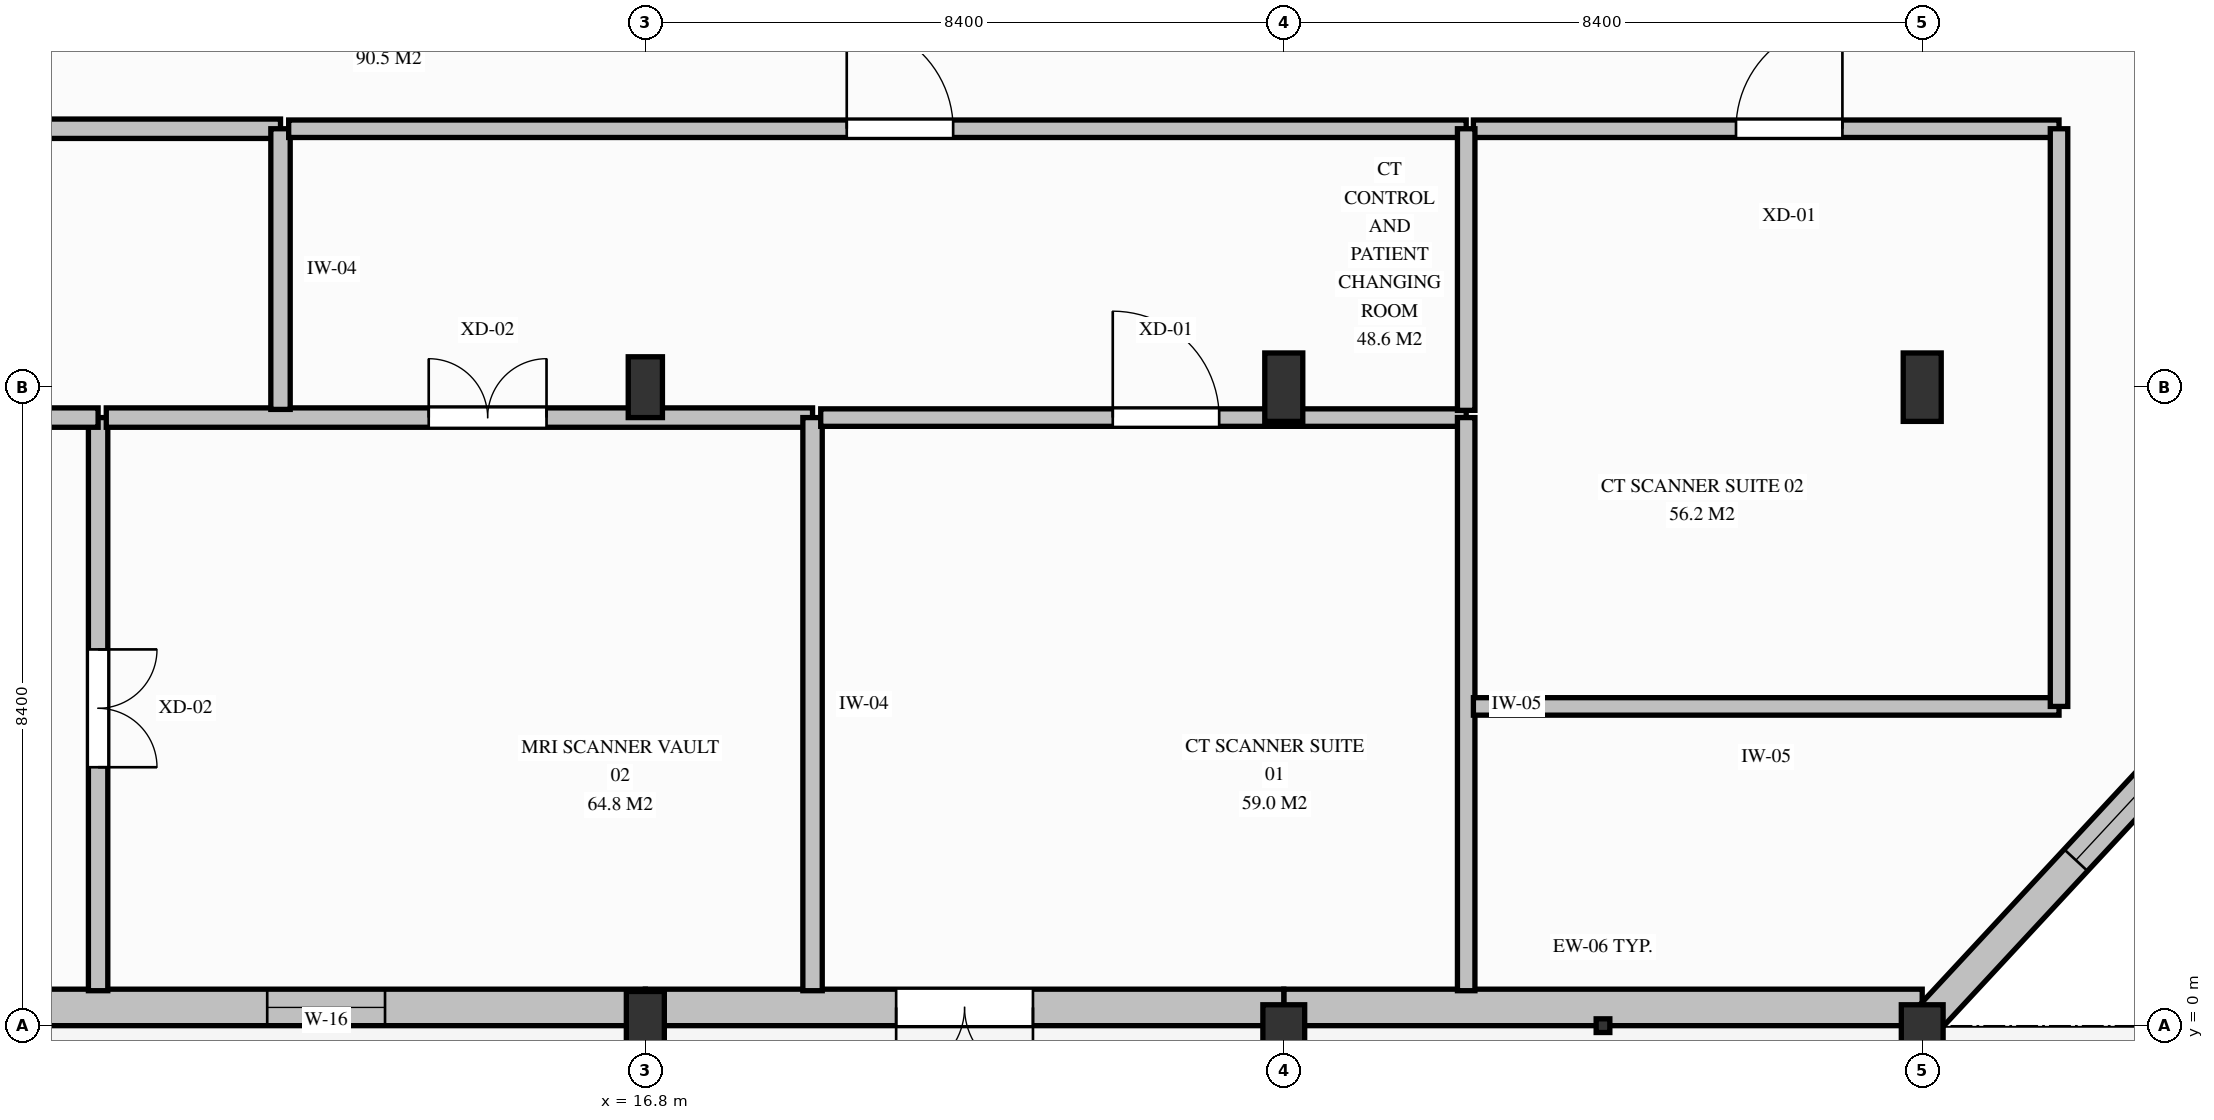
"""IFC4 building model, lengths in metres.
Left out: names, types, materials, properties, quantities, classifications, styles, units other than length and angle.
Written with IfcOpenShell. Run it as: python <this file> out.ifc"""

import sys

from ifc_helpers import new_model, si_unit, direction, frame, frame_2d, origin, origin_2d, place, context, subcontext, project, spatial, rectangle, hollow_rectangle, circle, extrude, element, fill, save


model = new_model("IFC4")
c1 = context("Model", 3, precision=1e-05, world=origin(), true_north=direction((0.0, 1.0)))
c2 = subcontext(c1, "Body", "Model", "MODEL_VIEW")
j1 = project(units=[si_unit("LENGTHUNIT", "METRE"), si_unit("PLANEANGLEUNIT", "RADIAN")], contexts=[c1])
p1 = place(None, origin())
s1 = spatial("IfcSite", under=j1, at=p1, CompositionType="ELEMENT")
p2 = place(p1, origin())
s2 = spatial("IfcBuilding", under=s1, at=p2, CompositionType="ELEMENT")
p3 = place(p2, origin())
s3 = spatial("IfcBuildingStorey", under=s2, at=p3, CompositionType="ELEMENT", Elevation=0.0)
p4 = place(p3, frame((16.8, 0.0, 0.0), z_axis=(0.0, 0.0, 1.0), x_axis=(1.0, 0.0, 0.0)))
e1 = element("IfcColumn", 1, at=p4, inside=s3, PredefinedType="COLUMN", context=c2, shape_type="SweptSolid", body=[
    extrude(rectangle(XDim=0.5, YDim=0.9, at=origin_2d()), origin(), (0.0, 0.0, 1.0), 4.5),
])
p5 = place(p3, frame((16.8, 8.4, 0.0), z_axis=(0.0, 0.0, 1.0), x_axis=(1.0, 0.0, 0.0)))
e2 = element("IfcColumn", 2, at=p5, inside=s3, PredefinedType="COLUMN", context=c2, shape_type="SweptSolid", body=[
    extrude(rectangle(XDim=0.45, YDim=0.8, at=origin_2d()), origin(), (0.0, 0.0, 1.0), 4.5),
])
p6 = place(p3, frame((25.2, 0.0, 0.0), z_axis=(0.0, 0.0, 1.0), x_axis=(1.0, 0.0, 0.0)))
e3 = element("IfcColumn", 3, at=p6, inside=s3, PredefinedType="COLUMN", context=c2, shape_type="SweptSolid", body=[
    extrude(circle(Radius=0.275, at=origin_2d()), origin(), (0.0, 0.0, 1.0), 4.5),
])
p7 = place(p3, frame((25.2, 8.4, 0.0), z_axis=(0.0, 0.0, 1.0), x_axis=(1.0, 0.0, 0.0)))
e4 = element("IfcColumn", 4, at=p7, inside=s3, PredefinedType="COLUMN", context=c2, shape_type="SweptSolid", body=[
    extrude(rectangle(XDim=0.5, YDim=0.9, at=origin_2d()), origin(), (0.0, 0.0, 1.0), 4.5),
])
p8 = place(p3, frame((33.6, 0.0, 0.0), z_axis=(0.0, 0.0, 1.0), x_axis=(1.0, 0.0, 0.0)))
e5 = element("IfcColumn", 5, at=p8, inside=s3, PredefinedType="COLUMN", context=c2, shape_type="SweptSolid", body=[
    extrude(circle(Radius=0.275, at=origin_2d()), origin(), (0.0, 0.0, 1.0), 4.5),
])
p9 = place(p3, frame((33.6, 8.4, 0.0), z_axis=(0.0, 0.0, 1.0), x_axis=(1.0, 0.0, 0.0)))
e6 = element("IfcColumn", 6, at=p9, inside=s3, PredefinedType="COLUMN", context=c2, shape_type="SweptSolid", body=[
    extrude(rectangle(XDim=0.5, YDim=0.9, at=origin_2d()), origin(), (0.0, 0.0, 1.0), 4.5),
])
p10 = place(p3, frame((29.4, 0.0, 0.0), z_axis=(0.0, 0.0, 1.0), x_axis=(1.0, 0.0, 0.0)))
e7 = element("IfcColumn", 7, at=p10, inside=s3, PredefinedType="PILASTER", context=c2, shape_type="SweptSolid", body=[
    extrude(hollow_rectangle(XDim=0.18, YDim=0.18, WallThickness=0.01, InnerFilletRadius=0.015, OuterFilletRadius=0.025, at=origin_2d()), origin(), (0.0, 0.0, 1.0), 4.5),
])
p11 = place(p3, frame((33.6, 0.24, 0.0), z_axis=(0.0, 0.0, 1.0), x_axis=(-1.0, 0.0, 0.0)))
e8 = element("IfcWall", 8, at=p11, inside=s3, PredefinedType="SOLIDWALL", context=c2, shape_type="SweptSolid", body=[
    extrude(rectangle(XDim=8.4, YDim=0.48, at=frame_2d((4.2, 0.0))), origin(), (0.0, 0.0, 1.0), 2.828),
])
p12 = place(p3, frame((25.2, 0.24, 0.0), z_axis=(0.0, 0.0, 1.0), x_axis=(-1.0, 0.0, 0.0)))
e9 = element("IfcWall", 9, at=p12, inside=s3, PredefinedType="SOLIDWALL", context=c2, shape_type="SweptSolid", body=[
    extrude(rectangle(XDim=8.4, YDim=0.48, at=frame_2d((4.2, 0.0))), origin(), (0.0, 0.0, 1.0), 2.828),
])
p13 = place(p12, frame((3.3, 0.0, 0.0)))
e10 = element("IfcOpeningElement", 10, at=p13, cuts=e9, PredefinedType="OPENING", context=c2, shape_type="SweptSolid", body=[
    extrude(rectangle(XDim=1.8, YDim=2.4, at=frame_2d((0.9, 1.2))), frame((0.0, 0.25, 0.0), z_axis=(0.0, -1.0, 0.0), x_axis=(1.0, 0.0, 0.0)), (0.0, 0.0, 1.0), 0.5),
])
p14 = place(p3, frame((16.8, 0.24, 0.0), z_axis=(0.0, 0.0, 1.0), x_axis=(-1.0, 0.0, 0.0)))
e11 = element("IfcWall", 11, at=p14, inside=s3, PredefinedType="SOLIDWALL", context=c2, shape_type="SweptSolid", body=[
    extrude(rectangle(XDim=8.4, YDim=0.48, at=frame_2d((4.2, 0.0))), origin(), (0.0, 0.0, 1.0), 2.828),
])
p15 = place(p14, frame((3.425, 0.0, 0.85)))
e12 = element("IfcOpeningElement", 12, at=p15, cuts=e11, PredefinedType="OPENING", context=c2, shape_type="SweptSolid", body=[
    extrude(rectangle(XDim=1.55, YDim=1.6, at=frame_2d((0.775, 0.8))), frame((0.0, 0.25, 0.0), z_axis=(0.0, -1.0, 0.0), x_axis=(1.0, 0.0, 0.0)), (0.0, 0.0, 1.0), 0.5),
])
p16 = place(p3, frame((41.4, 8.4, 0.0), z_axis=(0.0, 0.0, 1.0), x_axis=(-0.680446197767, -0.732798043082, 0.0)))
e13 = element("IfcWall", 13, at=p16, inside=s3, PredefinedType="SOLIDWALL", context=c2, shape_type="SweptSolid", body=[
    extrude(rectangle(XDim=11.463, YDim=0.42, at=frame_2d((5.731, 0.0))), origin(), (0.0, 0.0, 1.0), 2.828),
])
p17 = place(p16, frame((3.121, 0.0, 0.85)))
e14 = element("IfcOpeningElement", 14, at=p17, cuts=e13, PredefinedType="OPENING", context=c2, shape_type="SweptSolid", body=[
    extrude(rectangle(XDim=1.4, YDim=1.65, at=frame_2d((0.7, 0.825))), frame((0.0, 0.22, 0.0), z_axis=(0.0, -1.0, 0.0), x_axis=(1.0, 0.0, 0.0)), (0.0, 0.0, 1.0), 0.44),
])
p18 = place(p16, frame((6.792, 0.0, 0.85)))
e15 = element("IfcOpeningElement", 15, at=p18, cuts=e13, PredefinedType="OPENING", context=c2, shape_type="SweptSolid", body=[
    extrude(rectangle(XDim=1.7, YDim=1.75, at=frame_2d((0.85, 0.875))), frame((0.0, 0.22, 0.0), z_axis=(0.0, -1.0, 0.0), x_axis=(1.0, 0.0, 0.0)), (0.0, 0.0, 1.0), 0.44),
])
p19 = place(p3, frame((9.6, 8.0, 0.0), z_axis=(0.0, 0.0, 1.0), x_axis=(0.0, -1.0, 0.0)))
e16 = element("IfcWall", 16, at=p19, inside=s3, PredefinedType="PARTITIONING", context=c2, shape_type="SweptSolid", body=[
    extrude(rectangle(XDim=7.54, YDim=0.255, at=frame_2d((3.77, 0.0))), origin(), (0.0, 0.0, 1.0), 3.913),
])
p20 = place(p19, frame((3.05, 0.0, 0.0)))
e17 = element("IfcOpeningElement", 17, at=p20, cuts=e16, PredefinedType="OPENING", context=c2, shape_type="SweptSolid", body=[
    extrude(rectangle(XDim=1.55, YDim=2.22, at=frame_2d((0.775, 1.11))), frame((0.0, 0.137, 0.0), z_axis=(0.0, -1.0, 0.0), x_axis=(1.0, 0.0, 0.0)), (0.0, 0.0, 1.0), 0.275),
])
p21 = place(p3, frame((0.46, 8.0, 0.0), z_axis=(0.0, 0.0, 1.0), x_axis=(1.0, 0.0, 0.0)))
e18 = element("IfcWall", 18, at=p21, inside=s3, PredefinedType="PARTITIONING", context=c2, shape_type="SweptSolid", body=[
    extrude(rectangle(XDim=9.14, YDim=0.255, at=frame_2d((4.57, 0.0))), origin(), (0.0, 0.0, 1.0), 3.873),
])
p22 = place(p3, frame((9.708, 8.0, 0.0), z_axis=(0.0, 0.0, 1.0), x_axis=(1.0, 0.0, 0.0)))
e19 = element("IfcWall", 19, at=p22, inside=s3, PredefinedType="PARTITIONING", context=c2, shape_type="SweptSolid", body=[
    extrude(rectangle(XDim=9.292, YDim=0.255, at=frame_2d((4.646, 0.0))), origin(), (0.0, 0.0, 1.0), 3.763),
])
p23 = place(p22, frame((4.242, 0.0, 0.0)))
e20 = element("IfcOpeningElement", 20, at=p23, cuts=e19, PredefinedType="OPENING", context=c2, shape_type="SweptSolid", body=[
    extrude(rectangle(XDim=1.55, YDim=2.22, at=frame_2d((0.775, 1.11))), frame((0.0, 0.137, 0.0), z_axis=(0.0, -1.0, 0.0), x_axis=(1.0, 0.0, 0.0)), (0.0, 0.0, 1.0), 0.275),
])
p24 = place(p3, frame((19.0, 8.0, 0.0), z_axis=(0.0, 0.0, 1.0), x_axis=(0.0, -1.0, 0.0)))
e21 = element("IfcWall", 21, at=p24, inside=s3, PredefinedType="PARTITIONING", context=c2, shape_type="SweptSolid", body=[
    extrude(rectangle(XDim=7.54, YDim=0.255, at=frame_2d((3.77, 0.0))), origin(), (0.0, 0.0, 1.0), 3.973),
])
p25 = place(p3, frame((0.46, 11.8, 0.0), z_axis=(0.0, 0.0, 1.0), x_axis=(1.0, 0.0, 0.0)))
e22 = element("IfcWall", 22, at=p25, inside=s3, PredefinedType="PARTITIONING", context=c2, shape_type="SweptSolid", body=[
    extrude(rectangle(XDim=11.54, YDim=0.255, at=frame_2d((5.77, 0.0))), origin(), (0.0, 0.0, 1.0), 3.913),
])
p26 = place(p25, frame((5.39, 0.0, 0.0)))
e23 = element("IfcOpeningElement", 23, at=p26, cuts=e22, PredefinedType="OPENING", context=c2, shape_type="SweptSolid", body=[
    extrude(rectangle(XDim=1.55, YDim=2.22, at=frame_2d((0.775, 1.11))), frame((0.0, 0.137, 0.0), z_axis=(0.0, -1.0, 0.0), x_axis=(1.0, 0.0, 0.0)), (0.0, 0.0, 1.0), 0.275),
])
p27 = place(p3, frame((12.0, 11.8, 0.0), z_axis=(0.0, 0.0, 1.0), x_axis=(0.0, -1.0, 0.0)))
e24 = element("IfcWall", 24, at=p27, inside=s3, PredefinedType="PARTITIONING", context=c2, shape_type="SweptSolid", body=[
    extrude(rectangle(XDim=3.693, YDim=0.255, at=frame_2d((1.846, 0.0))), origin(), (0.0, 0.0, 1.0), 3.823),
])
p28 = place(p3, frame((19.107, 8.0, 0.0), z_axis=(0.0, 0.0, 1.0), x_axis=(1.0, 0.0, 0.0)))
e25 = element("IfcWall", 25, at=p28, inside=s3, PredefinedType="PARTITIONING", context=c2, shape_type="SweptSolid", body=[
    extrude(rectangle(XDim=8.493, YDim=0.23, at=frame_2d((4.246, 0.0))), origin(), (0.0, 0.0, 1.0), 3.663),
])
p29 = place(p28, frame((3.843, 0.0, 0.0)))
e26 = element("IfcOpeningElement", 26, at=p29, cuts=e25, PredefinedType="OPENING", context=c2, shape_type="SweptSolid", body=[
    extrude(rectangle(XDim=1.4, YDim=2.2, at=frame_2d((0.7, 1.1))), frame((0.0, 0.125, 0.0), z_axis=(0.0, -1.0, 0.0), x_axis=(1.0, 0.0, 0.0)), (0.0, 0.0, 1.0), 0.25),
])
p30 = place(p3, frame((27.6, 8.0, 0.0), z_axis=(0.0, 0.0, 1.0), x_axis=(0.0, -1.0, 0.0)))
e27 = element("IfcWall", 27, at=p30, inside=s3, PredefinedType="PARTITIONING", context=c2, shape_type="SweptSolid", body=[
    extrude(rectangle(XDim=7.54, YDim=0.23, at=frame_2d((3.77, 0.0))), origin(), (0.0, 0.0, 1.0), 4.23),
])
p31 = place(p3, frame((27.695, 11.8, 0.0), z_axis=(0.0, 0.0, 1.0), x_axis=(1.0, 0.0, 0.0)))
e28 = element("IfcWall", 28, at=p31, inside=s3, PredefinedType="PARTITIONING", context=c2, shape_type="SweptSolid", body=[
    extrude(rectangle(XDim=7.705, YDim=0.23, at=frame_2d((3.853, 0.0))), origin(), (0.0, 0.0, 1.0), 3.813),
])
p32 = place(p31, frame((3.455, 0.0, 0.0)))
e29 = element("IfcOpeningElement", 29, at=p32, cuts=e28, PredefinedType="OPENING", context=c2, shape_type="SweptSolid", body=[
    extrude(rectangle(XDim=1.4, YDim=2.2, at=frame_2d((0.7, 1.1))), frame((0.0, 0.125, 0.0), z_axis=(0.0, -1.0, 0.0), x_axis=(1.0, 0.0, 0.0)), (0.0, 0.0, 1.0), 0.25),
])
p33 = place(p3, frame((35.4, 4.2, 0.0), z_axis=(0.0, 0.0, 1.0), x_axis=(-1.0, 0.0, 0.0)))
e30 = element("IfcWall", 30, at=p33, inside=s3, PredefinedType="PARTITIONING", context=c2, shape_type="SweptSolid", body=[
    extrude(rectangle(XDim=7.705, YDim=0.23, at=frame_2d((3.853, 0.0))), origin(), (0.0, 0.0, 1.0), 3.763),
])
p34 = place(p3, frame((35.4, 11.8, 0.0), z_axis=(0.0, 0.0, 1.0), x_axis=(0.0, -1.0, 0.0)))
e31 = element("IfcWall", 31, at=p34, inside=s3, PredefinedType="PARTITIONING", context=c2, shape_type="SweptSolid", body=[
    extrude(rectangle(XDim=7.6, YDim=0.23, at=frame_2d((3.8, 0.0))), origin(), (0.0, 0.0, 1.0), 3.913),
])
p35 = place(p3, frame((12.107, 11.8, 0.0), z_axis=(0.0, 0.0, 1.0), x_axis=(1.0, 0.0, 0.0)))
e32 = element("IfcWall", 32, at=p35, inside=s3, PredefinedType="PARTITIONING", context=c2, shape_type="SweptSolid", body=[
    extrude(rectangle(XDim=15.493, YDim=0.23, at=frame_2d((7.746, 0.0))), origin(), (0.0, 0.0, 1.0), 3.613),
])
p36 = place(p35, frame((7.343, 0.0, 0.0)))
e33 = element("IfcOpeningElement", 33, at=p36, cuts=e32, PredefinedType="OPENING", context=c2, shape_type="SweptSolid", body=[
    extrude(rectangle(XDim=1.4, YDim=2.2, at=frame_2d((0.7, 1.1))), frame((0.0, 0.125, 0.0), z_axis=(0.0, -1.0, 0.0), x_axis=(1.0, 0.0, 0.0)), (0.0, 0.0, 1.0), 0.25),
])
p37 = place(p3, frame((27.6, 11.8, 0.0), z_axis=(0.0, 0.0, 1.0), x_axis=(0.0, -1.0, 0.0)))
e34 = element("IfcWall", 34, at=p37, inside=s3, PredefinedType="PARTITIONING", context=c2, shape_type="SweptSolid", body=[
    extrude(rectangle(XDim=3.705, YDim=0.23, at=frame_2d((1.853, 0.0))), origin(), (0.0, 0.0, 1.0), 3.943),
])
p38 = place(p13, origin())
e35 = element("IfcDoor", 35, at=p38, inside=s3, OperationType="DOUBLE_DOOR_SINGLE_SWING", PredefinedType="DOOR", context=c2, shape_type="SweptSolid", body=[
    extrude(rectangle(XDim=1.8, YDim=2.4, at=frame_2d((0.9, 1.2))), frame((0.0, 0.025, 0.0), z_axis=(0.0, -1.0, 0.0), x_axis=(1.0, 0.0, 0.0)), (0.0, 0.0, 1.0), 0.05),
])
fill(e10, e35)
p39 = place(p15, origin())
e36 = element("IfcWindow", 36, at=p39, inside=s3, PartitioningType="SINGLE_PANEL", PredefinedType="WINDOW", context=c2, shape_type="SweptSolid", body=[
    extrude(rectangle(XDim=1.55, YDim=1.6, at=frame_2d((0.775, 0.8))), frame((0.0, 0.03, 0.0), z_axis=(0.0, -1.0, 0.0), x_axis=(1.0, 0.0, 0.0)), (0.0, 0.0, 1.0), 0.06),
])
fill(e12, e36)
p40 = place(p18, origin())
e37 = element("IfcWindow", 37, at=p40, inside=s3, PartitioningType="SINGLE_PANEL", PredefinedType="WINDOW", context=c2, shape_type="SweptSolid", body=[
    extrude(rectangle(XDim=1.7, YDim=1.75, at=frame_2d((0.85, 0.875))), frame((0.0, 0.03, 0.0), z_axis=(0.0, -1.0, 0.0), x_axis=(1.0, 0.0, 0.0)), (0.0, 0.0, 1.0), 0.06),
])
fill(e15, e37)
p41 = place(p20, origin())
e38 = element("IfcDoor", 38, at=p41, inside=s3, OperationType="DOUBLE_DOOR_SINGLE_SWING", PredefinedType="DOOR", context=c2, shape_type="SweptSolid", body=[
    extrude(rectangle(XDim=1.55, YDim=2.22, at=frame_2d((0.775, 1.11))), frame((0.0, 0.025, 0.0), z_axis=(0.0, -1.0, 0.0), x_axis=(1.0, 0.0, 0.0)), (0.0, 0.0, 1.0), 0.05),
])
fill(e17, e38)
p42 = place(p23, origin())
e39 = element("IfcDoor", 39, at=p42, inside=s3, OperationType="DOUBLE_DOOR_SINGLE_SWING", PredefinedType="DOOR", context=c2, shape_type="SweptSolid", body=[
    extrude(rectangle(XDim=1.55, YDim=2.22, at=frame_2d((0.775, 1.11))), frame((0.0, 0.025, 0.0), z_axis=(0.0, -1.0, 0.0), x_axis=(1.0, 0.0, 0.0)), (0.0, 0.0, 1.0), 0.05),
])
fill(e20, e39)
p43 = place(p29, origin())
e40 = element("IfcDoor", 40, at=p43, inside=s3, OperationType="SINGLE_SWING_LEFT", PredefinedType="DOOR", context=c2, shape_type="SweptSolid", body=[
    extrude(rectangle(XDim=1.4, YDim=2.2, at=frame_2d((0.7, 1.1))), frame((0.0, 0.025, 0.0), z_axis=(0.0, -1.0, 0.0), x_axis=(1.0, 0.0, 0.0)), (0.0, 0.0, 1.0), 0.05),
])
fill(e26, e40)
p44 = place(p32, origin())
e41 = element("IfcDoor", 41, at=p44, inside=s3, OperationType="SINGLE_SWING_RIGHT", PredefinedType="DOOR", context=c2, shape_type="SweptSolid", body=[
    extrude(rectangle(XDim=1.4, YDim=2.2, at=frame_2d((0.7, 1.1))), frame((0.0, 0.025, 0.0), z_axis=(0.0, -1.0, 0.0), x_axis=(1.0, 0.0, 0.0)), (0.0, 0.0, 1.0), 0.05),
])
fill(e29, e41)
p45 = place(p36, origin())
e42 = element("IfcDoor", 42, at=p45, inside=s3, OperationType="SINGLE_SWING_LEFT", PredefinedType="DOOR", context=c2, shape_type="SweptSolid", body=[
    extrude(rectangle(XDim=1.4, YDim=2.2, at=frame_2d((0.7, 1.1))), frame((0.0, 0.025, 0.0), z_axis=(0.0, -1.0, 0.0), x_axis=(1.0, 0.0, 0.0)), (0.0, 0.0, 1.0), 0.05),
])
fill(e33, e42)
save(model, sys.argv[1])
